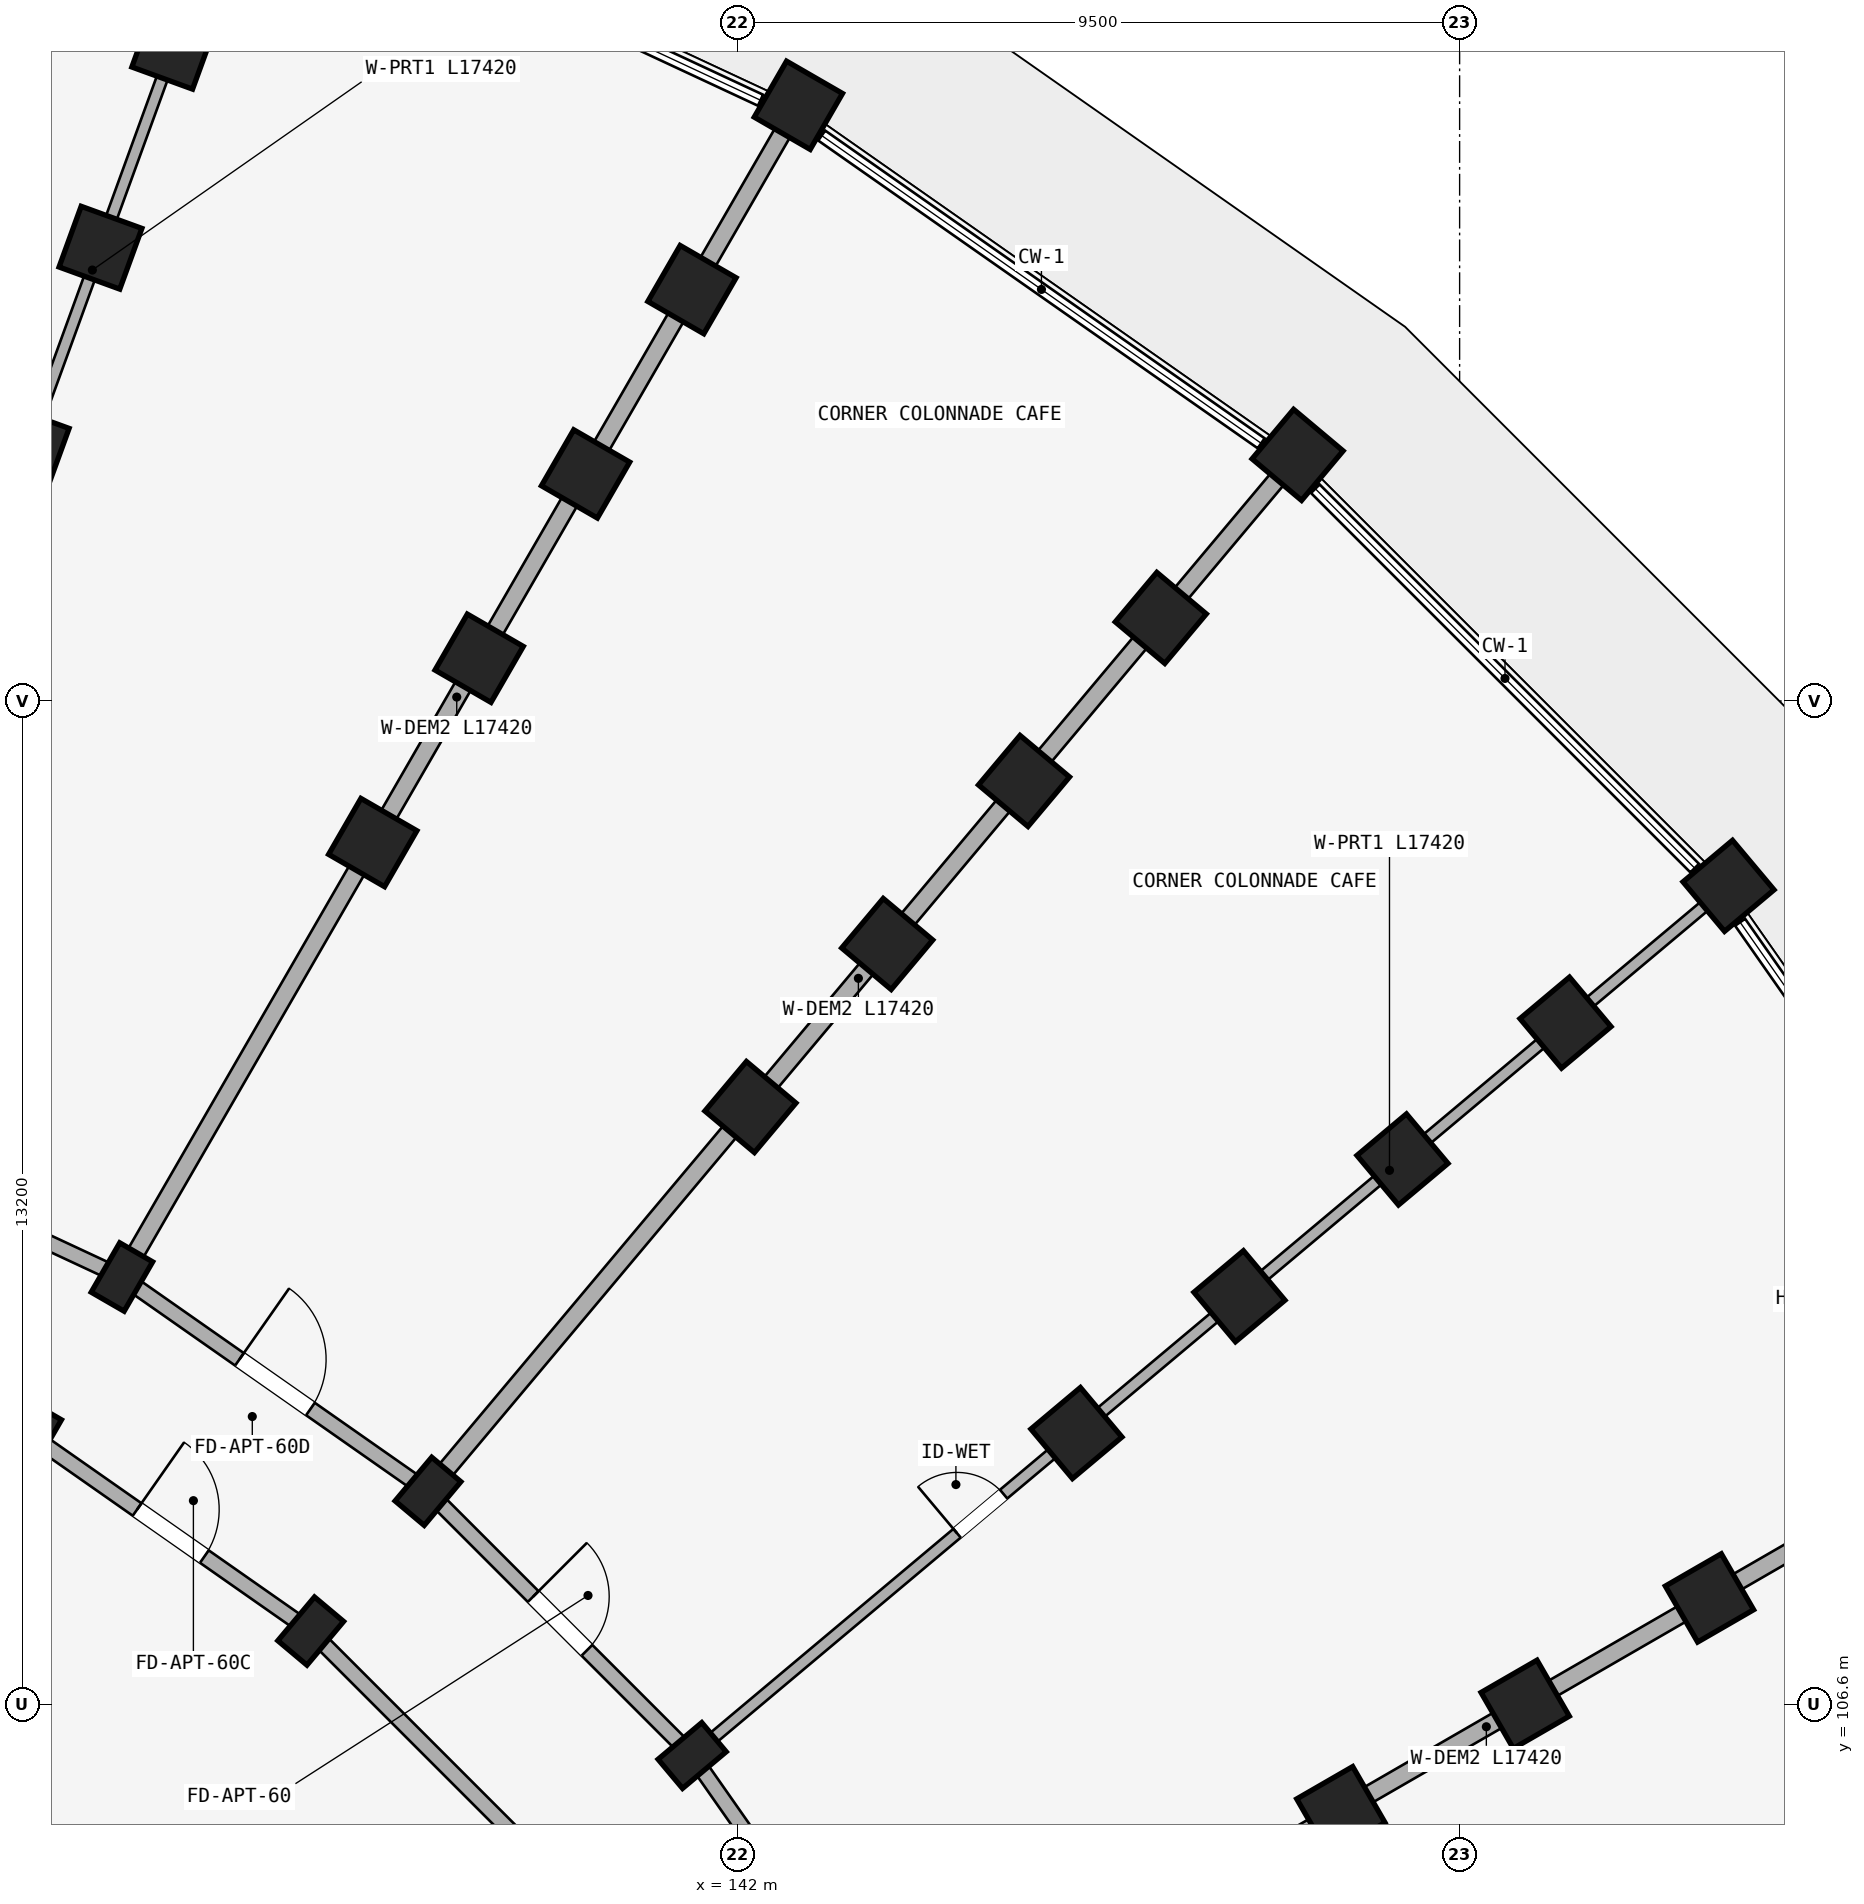
"""IFC4 building model, lengths in metres.
Left out: names, types, materials, properties, quantities, classifications, styles, units other than length and angle.
Written with IfcOpenShell. Run it as: python <this file> out.ifc"""

import sys

from ifc_helpers import new_model, si_unit, direction, frame, frame_2d, origin, origin_2d, place, context, subcontext, project, spatial, rectangle, extrude, element, fill, save


model = new_model("IFC4")
c1 = context("Model", 3, precision=1e-05, world=origin(), true_north=direction((0.0, 1.0)))
c2 = subcontext(c1, "Body", "Model", "MODEL_VIEW")
j1 = project(units=[si_unit("LENGTHUNIT", "METRE"), si_unit("PLANEANGLEUNIT", "RADIAN")], contexts=[c1])
p1 = place(None, origin())
s1 = spatial("IfcSite", under=j1, at=p1, CompositionType="ELEMENT")
p2 = place(p1, origin())
s2 = spatial("IfcBuilding", under=s1, at=p2, CompositionType="ELEMENT")
p3 = place(p2, origin())
s3 = spatial("IfcBuildingStorey", under=s2, at=p3, CompositionType="ELEMENT", Elevation=0.0)
for number, where, z_axis, x_axis in (
    (1, (132.66, 123.132, 0.0), (0.0, 0.0, 1.0), (-0.94, 0.342, 0.0)),
    (2, (133.618, 125.764, 0.0), (0.0, 0.0, 1.0), (-0.94, 0.342, 0.0)),
    (3, (134.575, 128.395, 0.0), (0.0, 0.0, 1.0), (-0.94, 0.342, 0.0)),
):
    element("IfcColumn", number, at=place(p3, frame(where, z_axis=z_axis, x_axis=x_axis)), inside=s3, PredefinedType="COLUMN", context=c2, shape_type="SweptSolid", body=[
        extrude(rectangle(XDim=0.85, YDim=0.85, at=origin_2d()), origin(), (0.0, 0.0, 1.0), 4.15),
    ])
for number, where, z_axis, x_axis in (
    (4, (132.7, 110.144, 0.0), (0.0, 0.0, 1.0), (-0.866, 0.5, 0.0)),
    (5, (133.9, 112.222, 0.0), (0.0, 0.0, 1.0), (-0.866, 0.5, 0.0)),
):
    element("IfcColumn", number, at=place(p3, frame(where, z_axis=z_axis, x_axis=x_axis)), inside=s3, PredefinedType="COLUMN", context=c2, shape_type="SweptSolid", body=[
        extrude(rectangle(XDim=0.5, YDim=0.75, at=origin_2d()), origin(), (0.0, 0.0, 1.0), 4.15),
    ])
for number, where, z_axis, x_axis in (
    (6, (137.2, 117.938, 0.0), (0.0, 0.0, 1.0), (-0.866, 0.5, 0.0)),
    (7, (138.6, 120.363, 0.0), (0.0, 0.0, 1.0), (-0.866, 0.5, 0.0)),
    (8, (140.0, 122.787, 0.0), (0.0, 0.0, 1.0), (-0.866, 0.5, 0.0)),
    (9, (141.4, 125.212, 0.0), (0.0, 0.0, 1.0), (-0.866, 0.5, 0.0)),
    (10, (142.8, 127.637, 0.0), (0.0, 0.0, 1.0), (-0.866, 0.5, 0.0)),
):
    element("IfcColumn", number, at=place(p3, frame(where, z_axis=z_axis, x_axis=x_axis)), inside=s3, PredefinedType="COLUMN", context=c2, shape_type="SweptSolid", body=[
        extrude(rectangle(XDim=0.85, YDim=0.85, at=origin_2d()), origin(), (0.0, 0.0, 1.0), 4.15),
    ])
for number, where, z_axis, x_axis in (
    (11, (136.384, 107.564, 0.0), (0.0, 0.0, 1.0), (-0.766, 0.643, 0.0)),
    (12, (137.927, 109.402, 0.0), (0.0, 0.0, 1.0), (-0.766, 0.643, 0.0)),
):
    element("IfcColumn", number, at=place(p3, frame(where, z_axis=z_axis, x_axis=x_axis)), inside=s3, PredefinedType="COLUMN", context=c2, shape_type="SweptSolid", body=[
        extrude(rectangle(XDim=0.5, YDim=0.75, at=origin_2d()), origin(), (0.0, 0.0, 1.0), 4.15),
    ])
for number, where, z_axis, x_axis in (
    (13, (142.169, 114.458, 0.0), (0.0, 0.0, 1.0), (-0.766, 0.643, 0.0)),
    (14, (143.969, 116.603, 0.0), (0.0, 0.0, 1.0), (-0.766, 0.643, 0.0)),
    (15, (145.769, 118.748, 0.0), (0.0, 0.0, 1.0), (-0.766, 0.643, 0.0)),
    (16, (147.568, 120.893, 0.0), (0.0, 0.0, 1.0), (-0.766, 0.643, 0.0)),
    (17, (149.368, 123.038, 0.0), (0.0, 0.0, 1.0), (-0.766, 0.643, 0.0)),
):
    element("IfcColumn", number, at=place(p3, frame(where, z_axis=z_axis, x_axis=x_axis)), inside=s3, PredefinedType="COLUMN", context=c2, shape_type="SweptSolid", body=[
        extrude(rectangle(XDim=0.85, YDim=0.85, at=origin_2d()), origin(), (0.0, 0.0, 1.0), 4.15),
    ])
p4 = place(p3, frame((141.402, 105.927, 0.0), z_axis=(0.0, 0.0, 1.0), x_axis=(-0.642787609687, 0.766044443119, 0.0)))
e18 = element("IfcColumn", 18, at=p4, inside=s3, PredefinedType="COLUMN", context=c2, shape_type="SweptSolid", body=[
    extrude(rectangle(XDim=0.5, YDim=0.75, at=origin_2d()), origin(), (0.0, 0.0, 1.0), 4.15),
])
for number, where, z_axis, x_axis in (
    (19, (146.458, 110.169, 0.0), (0.0, 0.0, 1.0), (-0.643, 0.766, 0.0)),
    (20, (148.603, 111.969, 0.0), (0.0, 0.0, 1.0), (-0.643, 0.766, 0.0)),
    (21, (150.748, 113.769, 0.0), (0.0, 0.0, 1.0), (-0.643, 0.766, 0.0)),
    (22, (152.893, 115.568, 0.0), (0.0, 0.0, 1.0), (-0.643, 0.766, 0.0)),
    (23, (155.038, 117.368, 0.0), (0.0, 0.0, 1.0), (-0.643, 0.766, 0.0)),
    (24, (149.938, 105.2, 0.0), (0.0, 0.0, 1.0), (-0.5, 0.866, 0.0)),
    (25, (152.363, 106.6, 0.0), (0.0, 0.0, 1.0), (-0.5, 0.866, 0.0)),
    (26, (154.787, 108.0, 0.0), (0.0, 0.0, 1.0), (-0.5, 0.866, 0.0)),
):
    element("IfcColumn", number, at=place(p3, frame(where, z_axis=z_axis, x_axis=x_axis)), inside=s3, PredefinedType="COLUMN", context=c2, shape_type="SweptSolid", body=[
        extrude(rectangle(XDim=0.85, YDim=0.85, at=origin_2d()), origin(), (0.0, 0.0, 1.0), 4.15),
    ])
p5 = place(p3, frame((129.445, 114.299, 0.0), z_axis=(0.0, 0.0, 1.0), x_axis=(0.906302381024, -0.422629854778, 0.0)))
e27 = element("IfcWall", 27, at=p5, inside=s3, PredefinedType="STANDARD", context=c2, shape_type="SweptSolid", body=[
    extrude(rectangle(XDim=4.915, YDim=0.2, at=frame_2d((2.458, 0.0))), origin(), (0.0, 0.0, 1.0), 2.942),
])
p6 = place(p3, frame((132.7, 110.144, 0.0), z_axis=(0.0, 0.0, 1.0), x_axis=(0.819155404658, -0.573571637217, 0.0)))
e28 = element("IfcWall", 28, at=p6, inside=s3, PredefinedType="STANDARD", context=c2, shape_type="SweptSolid", body=[
    extrude(rectangle(XDim=4.497, YDim=0.2, at=frame_2d((2.249, 0.0))), origin(), (0.0, 0.0, 1.0), 3.492),
])
p7 = place(p6, frame((1.709, 0.0, 0.0)))
e29 = element("IfcOpeningElement", 29, at=p7, cuts=e28, PredefinedType="OPENING", context=c2, shape_type="SweptSolid", body=[
    extrude(rectangle(XDim=1.08, YDim=2.15, at=frame_2d((0.54, 1.075))), frame((0.0, 0.11, 0.0), z_axis=(0.0, -1.0, 0.0), x_axis=(1.0, 0.0, 0.0)), (0.0, 0.0, 1.0), 0.22),
])
p8 = place(p3, frame((133.9, 112.222, 0.0), z_axis=(0.0, 0.0, 1.0), x_axis=(0.819140911474, -0.573592335331, 0.0)))
e30 = element("IfcWall", 30, at=p8, inside=s3, PredefinedType="STANDARD", context=c2, shape_type="SweptSolid", body=[
    extrude(rectangle(XDim=4.916, YDim=0.2, at=frame_2d((2.458, 0.0))), origin(), (0.0, 0.0, 1.0), 3.492),
])
p9 = place(p8, frame((1.888, 0.0, 0.0)))
e31 = element("IfcOpeningElement", 31, at=p9, cuts=e30, PredefinedType="OPENING", context=c2, shape_type="SweptSolid", body=[
    extrude(rectangle(XDim=1.14, YDim=2.15, at=frame_2d((0.57, 1.075))), frame((0.0, 0.11, 0.0), z_axis=(0.0, -1.0, 0.0), x_axis=(1.0, 0.0, 0.0)), (0.0, 0.0, 1.0), 0.22),
])
p10 = place(p3, frame((136.384, 107.564, 0.0), z_axis=(0.0, 0.0, 1.0), x_axis=(0.707106781187, -0.707106781187, 0.0)))
e32 = element("IfcWall", 32, at=p10, inside=s3, PredefinedType="STANDARD", context=c2, shape_type="SweptSolid", body=[
    extrude(rectangle(XDim=4.497, YDim=0.2, at=frame_2d((2.249, 0.0))), origin(), (0.0, 0.0, 1.0), 3.492),
])
p11 = place(p3, frame((137.927, 109.402, 0.0), z_axis=(0.0, 0.0, 1.0), x_axis=(0.707106781187, -0.707106781187, 0.0)))
e33 = element("IfcWall", 33, at=p11, inside=s3, PredefinedType="STANDARD", context=c2, shape_type="SweptSolid", body=[
    extrude(rectangle(XDim=4.916, YDim=0.2, at=frame_2d((2.458, 0.0))), origin(), (0.0, 0.0, 1.0), 3.492),
])
p12 = place(p11, frame((1.958, 0.0, 0.0)))
e34 = element("IfcOpeningElement", 34, at=p12, cuts=e33, PredefinedType="OPENING", context=c2, shape_type="SweptSolid", body=[
    extrude(rectangle(XDim=1.0, YDim=2.15, at=frame_2d((0.5, 1.075))), frame((0.0, 0.11, 0.0), z_axis=(0.0, -1.0, 0.0), x_axis=(1.0, 0.0, 0.0)), (0.0, 0.0, 1.0), 0.22),
])
p13 = place(p3, frame((141.402, 105.927, 0.0), z_axis=(0.0, 0.0, 1.0), x_axis=(0.573592335331, -0.819140911474, 0.0)))
e35 = element("IfcWall", 35, at=p13, inside=s3, PredefinedType="STANDARD", context=c2, shape_type="SweptSolid", body=[
    extrude(rectangle(XDim=4.916, YDim=0.2, at=frame_2d((2.458, 0.0))), origin(), (0.0, 0.0, 1.0), 3.492),
])
p14 = place(p3, frame((129.479, 114.393, 0.0), z_axis=(0.0, 0.0, 1.0), x_axis=(0.342022120477, 0.939691901159, 0.0)))
e36 = element("IfcWall", 36, at=p14, inside=s3, PredefinedType="PARTITIONING", context=c2, shape_type="SweptSolid", body=[
    extrude(rectangle(XDim=17.42, YDim=0.15, at=frame_2d((8.71, 0.0))), origin(), (0.0, 0.0, 1.0), 3.492),
])
p15 = place(p14, frame((4.45, 0.0, 0.0)))
e37 = element("IfcOpeningElement", 37, at=p15, cuts=e36, PredefinedType="OPENING", context=c2, shape_type="SweptSolid", body=[
    extrude(rectangle(XDim=0.8, YDim=2.1, at=frame_2d((0.4, 1.05))), frame((0.0, 0.085, 0.0), z_axis=(0.0, -1.0, 0.0), x_axis=(1.0, 0.0, 0.0)), (0.0, 0.0, 1.0), 0.17),
])
p16 = place(p3, frame((133.95, 112.309, 0.0), z_axis=(0.0, 0.0, 1.0), x_axis=(0.499997843263, 0.866026648973, 0.0)))
e38 = element("IfcWall", 38, at=p16, inside=s3, PredefinedType="STANDARD", context=c2, shape_type="SweptSolid", body=[
    extrude(rectangle(XDim=17.42, YDim=0.23, at=frame_2d((8.71, 0.0))), origin(), (0.0, 0.0, 1.0), 2.942),
])
p17 = place(p3, frame((137.991, 109.479, 0.0), z_axis=(0.0, 0.0, 1.0), x_axis=(0.642784757967, 0.766046835987, 0.0)))
e39 = element("IfcWall", 39, at=p17, inside=s3, PredefinedType="STANDARD", context=c2, shape_type="SweptSolid", body=[
    extrude(rectangle(XDim=17.42, YDim=0.23, at=frame_2d((8.71, 0.0))), origin(), (0.0, 0.0, 1.0), 3.492),
])
p18 = place(p3, frame((141.479, 105.991, 0.0), z_axis=(0.0, 0.0, 1.0), x_axis=(0.766046835987, 0.642784757967, 0.0)))
e40 = element("IfcWall", 40, at=p18, inside=s3, PredefinedType="PARTITIONING", context=c2, shape_type="SweptSolid", body=[
    extrude(rectangle(XDim=17.42, YDim=0.15, at=frame_2d((8.71, 0.0))), origin(), (0.0, 0.0, 1.0), 3.492),
])
p19 = place(p18, frame((4.45, 0.0, 0.0)))
e41 = element("IfcOpeningElement", 41, at=p19, cuts=e40, PredefinedType="OPENING", context=c2, shape_type="SweptSolid", body=[
    extrude(rectangle(XDim=0.8, YDim=2.1, at=frame_2d((0.4, 1.05))), frame((0.0, 0.085, 0.0), z_axis=(0.0, -1.0, 0.0), x_axis=(1.0, 0.0, 0.0)), (0.0, 0.0, 1.0), 0.17),
])
p20 = place(p3, frame((144.309, 101.95, 0.0), z_axis=(0.0, 0.0, 1.0), x_axis=(0.866026648973, 0.499997843263, 0.0)))
e42 = element("IfcWall", 42, at=p20, inside=s3, PredefinedType="STANDARD", context=c2, shape_type="SweptSolid", body=[
    extrude(rectangle(XDim=17.42, YDim=0.23, at=frame_2d((8.71, 0.0))), origin(), (0.0, 0.0, 1.0), 3.492),
])
p21 = place(p19, frame((0.8, 0.0, 0.0), z_axis=(0.0, 0.0, 1.0), x_axis=(-1.0, 0.0, 0.0)))
e43 = element("IfcDoor", 43, at=p21, inside=s3, OperationType="SINGLE_SWING_RIGHT", PredefinedType="DOOR", context=c2, shape_type="SweptSolid", body=[
    extrude(rectangle(XDim=0.8, YDim=2.1, at=frame_2d((0.4, 1.05))), frame((0.0, 0.025, 0.0), z_axis=(0.0, -1.0, 0.0), x_axis=(1.0, 0.0, 0.0)), (0.0, 0.0, 1.0), 0.05),
])
fill(e41, e43)
p22 = place(p9, origin())
e44 = element("IfcDoor", 44, at=p22, inside=s3, OperationType="SINGLE_SWING_LEFT", PredefinedType="DOOR", context=c2, shape_type="SweptSolid", body=[
    extrude(rectangle(XDim=1.14, YDim=2.15, at=frame_2d((0.57, 1.075))), frame((0.0, 0.025, 0.0), z_axis=(0.0, -1.0, 0.0), x_axis=(1.0, 0.0, 0.0)), (0.0, 0.0, 1.0), 0.05),
])
fill(e31, e44)
p23 = place(p12, frame((1.0, 0.0, 0.0), z_axis=(0.0, 0.0, 1.0), x_axis=(-1.0, 0.0, 0.0)))
e45 = element("IfcDoor", 45, at=p23, inside=s3, OperationType="SINGLE_SWING_RIGHT", PredefinedType="DOOR", context=c2, shape_type="SweptSolid", body=[
    extrude(rectangle(XDim=1.0, YDim=2.15, at=frame_2d((0.5, 1.075))), frame((0.0, 0.025, 0.0), z_axis=(0.0, -1.0, 0.0), x_axis=(1.0, 0.0, 0.0)), (0.0, 0.0, 1.0), 0.05),
])
fill(e34, e45)
p24 = place(p7, frame((1.08, 0.0, 0.0), z_axis=(0.0, 0.0, 1.0), x_axis=(-1.0, 0.0, 0.0)))
e46 = element("IfcDoor", 46, at=p24, inside=s3, OperationType="SINGLE_SWING_RIGHT", PredefinedType="DOOR", context=c2, shape_type="SweptSolid", body=[
    extrude(rectangle(XDim=1.08, YDim=2.15, at=frame_2d((0.54, 1.075))), frame((0.0, 0.025, 0.0), z_axis=(0.0, -1.0, 0.0), x_axis=(1.0, 0.0, 0.0)), (0.0, 0.0, 1.0), 0.05),
])
fill(e29, e46)
save(model, sys.argv[1])
